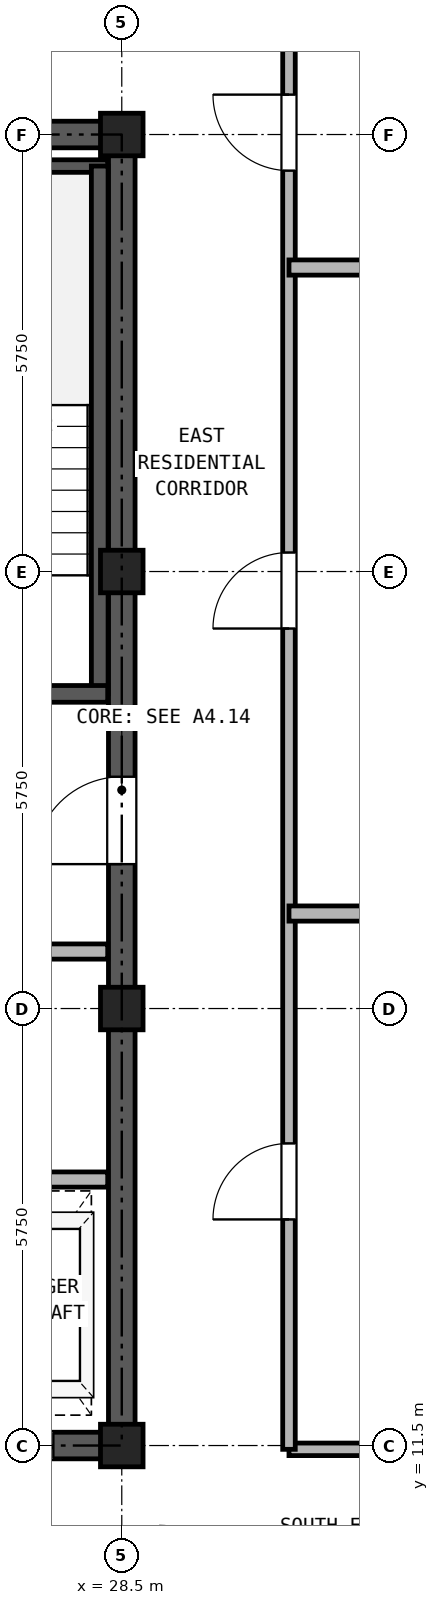
"""IFC4 building model, lengths in metres.
Left out: names, types, materials, properties, quantities, classifications, styles, units other than length and angle.
Written with IfcOpenShell. Run it as: python <this file> out.ifc"""

import sys

from ifc_helpers import new_model, si_unit, direction, frame, frame_2d, origin, origin_2d, place, context, subcontext, project, spatial, rectangle, hollow_rectangle, extrude, source, transform, mapped, element, fill, save


model = new_model("IFC4")
c1 = context("Model", 3, precision=1e-05, world=origin(), true_north=direction((0.0, 1.0)))
c2 = subcontext(c1, "Body", "Model", "MODEL_VIEW")
j1 = project(units=[si_unit("LENGTHUNIT", "METRE"), si_unit("PLANEANGLEUNIT", "RADIAN")], contexts=[c1])
p1 = place(None, origin())
s1 = spatial("IfcSite", under=j1, at=p1, CompositionType="ELEMENT")
p2 = place(p1, origin())
s2 = spatial("IfcBuilding", under=s1, at=p2, CompositionType="ELEMENT")
p3 = place(p2, frame((0.0, 0.0, 232.9)))
s3 = spatial("IfcBuildingStorey", under=s2, at=p3, CompositionType="ELEMENT", Elevation=232.9)
m1 = source(origin(), c2, "Body", "SweptSolid", [
    extrude(hollow_rectangle(XDim=0.56, YDim=0.56, WallThickness=0.03, at=origin_2d()), origin(), (0.0, 0.0, 1.0), 2.98),
])
for number, where, z_axis, x_axis in (
    (1, (28.5, 11.5, 0.0), (0.0, 0.0, 1.0), (1.0, 0.0, 0.0)),
    (2, (28.5, 17.25, 0.0), (0.0, 0.0, 1.0), (1.0, 0.0, 0.0)),
    (3, (28.5, 23.0, 0.0), (0.0, 0.0, 1.0), (1.0, 0.0, 0.0)),
    (4, (28.5, 28.75, 0.0), (0.0, 0.0, 1.0), (1.0, 0.0, 0.0)),
):
    element("IfcColumn", number, at=place(p3, frame(where, z_axis=z_axis, x_axis=x_axis)), inside=s3, PredefinedType="COLUMN", context=c2, shape_type="MappedRepresentation", body=[
        mapped(m1, transform((0.0, 0.0, 0.0), x_axis=(1.0, 0.0, 0.0), y_axis=(0.0, 1.0, 0.0), z_axis=(0.0, 0.0, 1.0), scale=1.0)),
    ])
p4 = place(p3, frame((18.325, 11.5, 0.0), z_axis=(0.0, 0.0, 1.0), x_axis=(1.0, 0.0, 0.0)))
e5 = element("IfcWall", 5, at=p4, inside=s3, PredefinedType="SHEAR", context=c2, shape_type="SweptSolid", body=[
    extrude(rectangle(XDim=10.35, YDim=0.35, at=frame_2d((5.175, 0.0))), origin(), (0.0, 0.0, 1.0), 2.98),
])
p5 = place(p4, frame((1.775, 0.0, 0.0)))
e6 = element("IfcOpeningElement", 6, at=p5, cuts=e5, PredefinedType="OPENING", context=c2, shape_type="SweptSolid", body=[
    extrude(rectangle(XDim=0.95, YDim=2.15, at=frame_2d((0.475, 1.075))), frame((0.0, 0.185, 0.0), z_axis=(0.0, -1.0, 0.0), x_axis=(1.0, 0.0, 0.0)), (0.0, 0.0, 1.0), 0.37),
])
p6 = place(p4, frame((5.275, 0.0, 0.0)))
e7 = element("IfcOpeningElement", 7, at=p6, cuts=e5, PredefinedType="OPENING", context=c2, shape_type="SweptSolid", body=[
    extrude(rectangle(XDim=0.95, YDim=2.15, at=frame_2d((0.475, 1.075))), frame((0.0, 0.185, 0.0), z_axis=(0.0, -1.0, 0.0), x_axis=(1.0, 0.0, 0.0)), (0.0, 0.0, 1.0), 0.37),
])
p7 = place(p4, frame((8.175, 0.0, 0.0)))
e8 = element("IfcOpeningElement", 8, at=p7, cuts=e5, PredefinedType="OPENING", context=c2, shape_type="SweptSolid", body=[
    extrude(rectangle(XDim=1.1, YDim=2.25, at=frame_2d((0.55, 1.125))), frame((0.0, 0.185, 0.0), z_axis=(0.0, -1.0, 0.0), x_axis=(1.0, 0.0, 0.0)), (0.0, 0.0, 1.0), 0.37),
])
p8 = place(p3, frame((18.325, 28.75, 0.0), z_axis=(0.0, 0.0, 1.0), x_axis=(1.0, 0.0, 0.0)))
e9 = element("IfcWall", 9, at=p8, inside=s3, PredefinedType="SHEAR", context=c2, shape_type="SweptSolid", body=[
    extrude(rectangle(XDim=10.35, YDim=0.35, at=frame_2d((5.175, 0.0))), origin(), (0.0, 0.0, 1.0), 2.98),
])
p9 = place(p8, frame((4.055, 0.0, 0.0)))
e10 = element("IfcOpeningElement", 10, at=p9, cuts=e9, PredefinedType="OPENING", context=c2, shape_type="SweptSolid", body=[
    extrude(rectangle(XDim=0.9, YDim=2.05, at=frame_2d((0.45, 1.025))), frame((0.0, 0.185, 0.0), z_axis=(0.0, -1.0, 0.0), x_axis=(1.0, 0.0, 0.0)), (0.0, 0.0, 1.0), 0.37),
])
p10 = place(p8, frame((5.595, 0.0, 0.0)))
e11 = element("IfcOpeningElement", 11, at=p10, cuts=e9, PredefinedType="OPENING", context=c2, shape_type="SweptSolid", body=[
    extrude(rectangle(XDim=0.9, YDim=2.05, at=frame_2d((0.45, 1.025))), frame((0.0, 0.185, 0.0), z_axis=(0.0, -1.0, 0.0), x_axis=(1.0, 0.0, 0.0)), (0.0, 0.0, 1.0), 0.37),
])
p11 = place(p3, frame((28.5, 11.675, 0.0), z_axis=(0.0, 0.0, 1.0), x_axis=(0.0, 1.0, 0.0)))
e12 = element("IfcWall", 12, at=p11, inside=s3, PredefinedType="SHEAR", context=c2, shape_type="SweptSolid", body=[
    extrude(rectangle(XDim=16.9, YDim=0.35, at=frame_2d((8.45, 0.0))), origin(), (0.0, 0.0, 1.0), 2.98),
])
p12 = place(p11, frame((7.475, 0.0, 0.0)))
e13 = element("IfcOpeningElement", 13, at=p12, cuts=e12, PredefinedType="OPENING", context=c2, shape_type="SweptSolid", body=[
    extrude(rectangle(XDim=1.15, YDim=2.2, at=frame_2d((0.575, 1.1))), frame((0.0, 0.185, 0.0), z_axis=(0.0, -1.0, 0.0), x_axis=(1.0, 0.0, 0.0)), (0.0, 0.0, 1.0), 0.37),
])
p13 = place(p3, frame((25.13, 28.335, 0.0), z_axis=(0.0, 0.0, 1.0), x_axis=(1.0, 0.0, 0.0)))
e14 = element("IfcWall", 14, at=p13, inside=s3, PredefinedType="PARTITIONING", context=c2, shape_type="SweptSolid", body=[
    extrude(rectangle(XDim=3.185, YDim=0.165, at=frame_2d((1.593, 0.0))), origin(), (0.0, 0.0, 1.0), 2.98),
])
p14 = place(p3, frame((28.21, 21.39, 0.0), z_axis=(0.0, 0.0, 1.0), x_axis=(0.0, 1.0, 0.0)))
e15 = element("IfcWall", 15, at=p14, inside=s3, PredefinedType="SOLIDWALL", context=c2, shape_type="SweptSolid", body=[
    extrude(rectangle(XDim=6.945, YDim=0.22, at=frame_2d((3.473, 0.0))), origin(), (0.0, 0.0, 1.0), 2.98),
])
p15 = place(p3, frame((25.13, 21.39, 0.0), z_axis=(0.0, 0.0, 1.0), x_axis=(1.0, 0.0, 0.0)))
e16 = element("IfcWall", 16, at=p15, inside=s3, PredefinedType="SOLIDWALL", context=c2, shape_type="SweptSolid", body=[
    extrude(rectangle(XDim=3.185, YDim=0.22, at=frame_2d((1.593, 0.0))), origin(), (0.0, 0.0, 1.0), 2.98),
])
p16 = place(p15, frame((0.92, 0.0, 0.0)))
e17 = element("IfcOpeningElement", 17, at=p16, cuts=e16, PredefinedType="OPENING", context=c2, shape_type="SweptSolid", body=[
    extrude(rectangle(XDim=1.15, YDim=2.2, at=frame_2d((0.575, 1.1))), frame((0.0, 0.12, 0.0), z_axis=(0.0, -1.0, 0.0), x_axis=(1.0, 0.0, 0.0)), (0.0, 0.0, 1.0), 0.24),
])
p17 = place(p3, frame((18.685, 18.0, 0.0), z_axis=(0.0, 0.0, 1.0), x_axis=(1.0, 0.0, 0.0)))
e18 = element("IfcWall", 18, at=p17, inside=s3, PredefinedType="PARTITIONING", context=c2, shape_type="SweptSolid", body=[
    extrude(rectangle(XDim=9.63, YDim=0.2, at=frame_2d((4.815, 0.0))), origin(), (0.0, 0.0, 1.0), 2.98),
])
p18 = place(p17, frame((0.565, 0.0, 0.0)))
e19 = element("IfcOpeningElement", 19, at=p18, cuts=e18, PredefinedType="OPENING", context=c2, shape_type="SweptSolid", body=[
    extrude(rectangle(XDim=1.3, YDim=2.3, at=frame_2d((0.65, 1.15))), frame((0.0, 0.11, 0.0), z_axis=(0.0, -1.0, 0.0), x_axis=(1.0, 0.0, 0.0)), (0.0, 0.0, 1.0), 0.22),
])
p19 = place(p17, frame((2.665, 0.0, 0.0)))
e20 = element("IfcOpeningElement", 20, at=p19, cuts=e18, PredefinedType="OPENING", context=c2, shape_type="SweptSolid", body=[
    extrude(rectangle(XDim=1.3, YDim=2.3, at=frame_2d((0.65, 1.15))), frame((0.0, 0.11, 0.0), z_axis=(0.0, -1.0, 0.0), x_axis=(1.0, 0.0, 0.0)), (0.0, 0.0, 1.0), 0.22),
])
p20 = place(p17, frame((7.165, 0.0, 0.0)))
e21 = element("IfcOpeningElement", 21, at=p20, cuts=e18, PredefinedType="OPENING", context=c2, shape_type="SweptSolid", body=[
    extrude(rectangle(XDim=1.0, YDim=2.15, at=frame_2d((0.5, 1.075))), frame((0.0, 0.11, 0.0), z_axis=(0.0, -1.0, 0.0), x_axis=(1.0, 0.0, 0.0)), (0.0, 0.0, 1.0), 0.22),
])
p21 = place(p3, frame((18.685, 15.0, 0.0), z_axis=(0.0, 0.0, 1.0), x_axis=(1.0, 0.0, 0.0)))
e22 = element("IfcWall", 22, at=p21, inside=s3, PredefinedType="PARTITIONING", context=c2, shape_type="SweptSolid", body=[
    extrude(rectangle(XDim=9.63, YDim=0.2, at=frame_2d((4.815, 0.0))), origin(), (0.0, 0.0, 1.0), 2.98),
])
p22 = place(p3, frame((30.7, 11.45, 0.0), z_axis=(0.0, 0.0, 1.0), x_axis=(1.0, 0.0, 0.0)))
e23 = element("IfcWall", 23, at=p22, inside=s3, PredefinedType="PARTITIONING", context=c2, shape_type="SweptSolid", body=[
    extrude(rectangle(XDim=7.5, YDim=0.165, at=frame_2d((3.75, 0.0))), origin(), (0.0, 0.0, 1.0), 2.428),
])
p23 = place(p3, frame((30.7, 11.45, 0.0), z_axis=(0.0, 0.0, 1.0), x_axis=(0.0, 1.0, 0.0)))
e24 = element("IfcWall", 24, at=p23, inside=s3, PredefinedType="PARTITIONING", context=c2, shape_type="SweptSolid", body=[
    extrude(rectangle(XDim=23.69, YDim=0.165, at=frame_2d((11.845, 0.0))), origin(), (0.0, 0.0, 1.0), 2.98),
])
p24 = place(p23, frame((3.025, 0.0, 0.0)))
e25 = element("IfcOpeningElement", 25, at=p24, cuts=e24, PredefinedType="OPENING", context=c2, shape_type="SweptSolid", body=[
    extrude(rectangle(XDim=1.0, YDim=2.15, at=frame_2d((0.5, 1.075))), frame((0.0, 0.093, 0.0), z_axis=(0.0, -1.0, 0.0), x_axis=(1.0, 0.0, 0.0)), (0.0, 0.0, 1.0), 0.185),
])
p25 = place(p23, frame((10.8, 0.0, 0.0)))
e26 = element("IfcOpeningElement", 26, at=p25, cuts=e24, PredefinedType="OPENING", context=c2, shape_type="SweptSolid", body=[
    extrude(rectangle(XDim=1.0, YDim=2.15, at=frame_2d((0.5, 1.075))), frame((0.0, 0.093, 0.0), z_axis=(0.0, -1.0, 0.0), x_axis=(1.0, 0.0, 0.0)), (0.0, 0.0, 1.0), 0.185),
])
p26 = place(p23, frame((16.825, 0.0, 0.0)))
e27 = element("IfcOpeningElement", 27, at=p26, cuts=e24, PredefinedType="OPENING", context=c2, shape_type="SweptSolid", body=[
    extrude(rectangle(XDim=1.0, YDim=2.15, at=frame_2d((0.5, 1.075))), frame((0.0, 0.093, 0.0), z_axis=(0.0, -1.0, 0.0), x_axis=(1.0, 0.0, 0.0)), (0.0, 0.0, 1.0), 0.185),
])
for number, where, z_axis, x_axis in (
    (28, (30.7, 18.5, 0.0), (0.0, 0.0, 1.0), (1.0, 0.0, 0.0)),
    (29, (30.7, 27.0, 0.0), (0.0, 0.0, 1.0), (1.0, 0.0, 0.0)),
):
    element("IfcWall", number, at=place(p3, frame(where, z_axis=z_axis, x_axis=x_axis)), inside=s3, PredefinedType="PARTITIONING", context=c2, shape_type="SweptSolid", body=[
        extrude(rectangle(XDim=10.94, YDim=0.2, at=frame_2d((5.47, 0.0))), origin(), (0.0, 0.0, 1.0), 2.98),
    ])
p27 = place(p12, origin())
e30 = element("IfcDoor", 30, at=p27, inside=s3, OperationType="SINGLE_SWING_LEFT", PredefinedType="DOOR", context=c2, shape_type="SweptSolid", body=[
    extrude(rectangle(XDim=1.15, YDim=2.2, at=frame_2d((0.575, 1.1))), frame((0.0, 0.025, 0.0), z_axis=(0.0, -1.0, 0.0), x_axis=(1.0, 0.0, 0.0)), (0.0, 0.0, 1.0), 0.05),
])
fill(e13, e30)
p28 = place(p7, frame((1.1, 0.0, 0.0), z_axis=(0.0, 0.0, 1.0), x_axis=(-1.0, 0.0, 0.0)))
e31 = element("IfcDoor", 31, at=p28, inside=s3, OperationType="DOUBLE_DOOR_SLIDING", PredefinedType="DOOR", context=c2, shape_type="SweptSolid", body=[
    extrude(rectangle(XDim=1.1, YDim=2.25, at=frame_2d((0.55, 1.125))), frame((0.0, 0.025, 0.0), z_axis=(0.0, -1.0, 0.0), x_axis=(1.0, 0.0, 0.0)), (0.0, 0.0, 1.0), 0.05),
])
fill(e8, e31)
p29 = place(p24, frame((1.0, 0.0, 0.0), z_axis=(0.0, 0.0, 1.0), x_axis=(-1.0, 0.0, 0.0)))
e32 = element("IfcDoor", 32, at=p29, inside=s3, OperationType="SINGLE_SWING_LEFT", PredefinedType="DOOR", context=c2, shape_type="SweptSolid", body=[
    extrude(rectangle(XDim=1.0, YDim=2.15, at=frame_2d((0.5, 1.075))), frame((0.0, 0.025, 0.0), z_axis=(0.0, -1.0, 0.0), x_axis=(1.0, 0.0, 0.0)), (0.0, 0.0, 1.0), 0.05),
])
fill(e25, e32)
p30 = place(p25, frame((1.0, 0.0, 0.0), z_axis=(0.0, 0.0, 1.0), x_axis=(-1.0, 0.0, 0.0)))
e33 = element("IfcDoor", 33, at=p30, inside=s3, OperationType="SINGLE_SWING_LEFT", PredefinedType="DOOR", context=c2, shape_type="SweptSolid", body=[
    extrude(rectangle(XDim=1.0, YDim=2.15, at=frame_2d((0.5, 1.075))), frame((0.0, 0.025, 0.0), z_axis=(0.0, -1.0, 0.0), x_axis=(1.0, 0.0, 0.0)), (0.0, 0.0, 1.0), 0.05),
])
fill(e26, e33)
p31 = place(p26, frame((1.0, 0.0, 0.0), z_axis=(0.0, 0.0, 1.0), x_axis=(-1.0, 0.0, 0.0)))
e34 = element("IfcDoor", 34, at=p31, inside=s3, OperationType="SINGLE_SWING_RIGHT", PredefinedType="DOOR", context=c2, shape_type="SweptSolid", body=[
    extrude(rectangle(XDim=1.0, YDim=2.15, at=frame_2d((0.5, 1.075))), frame((0.0, 0.025, 0.0), z_axis=(0.0, -1.0, 0.0), x_axis=(1.0, 0.0, 0.0)), (0.0, 0.0, 1.0), 0.05),
])
fill(e27, e34)
save(model, sys.argv[1])
